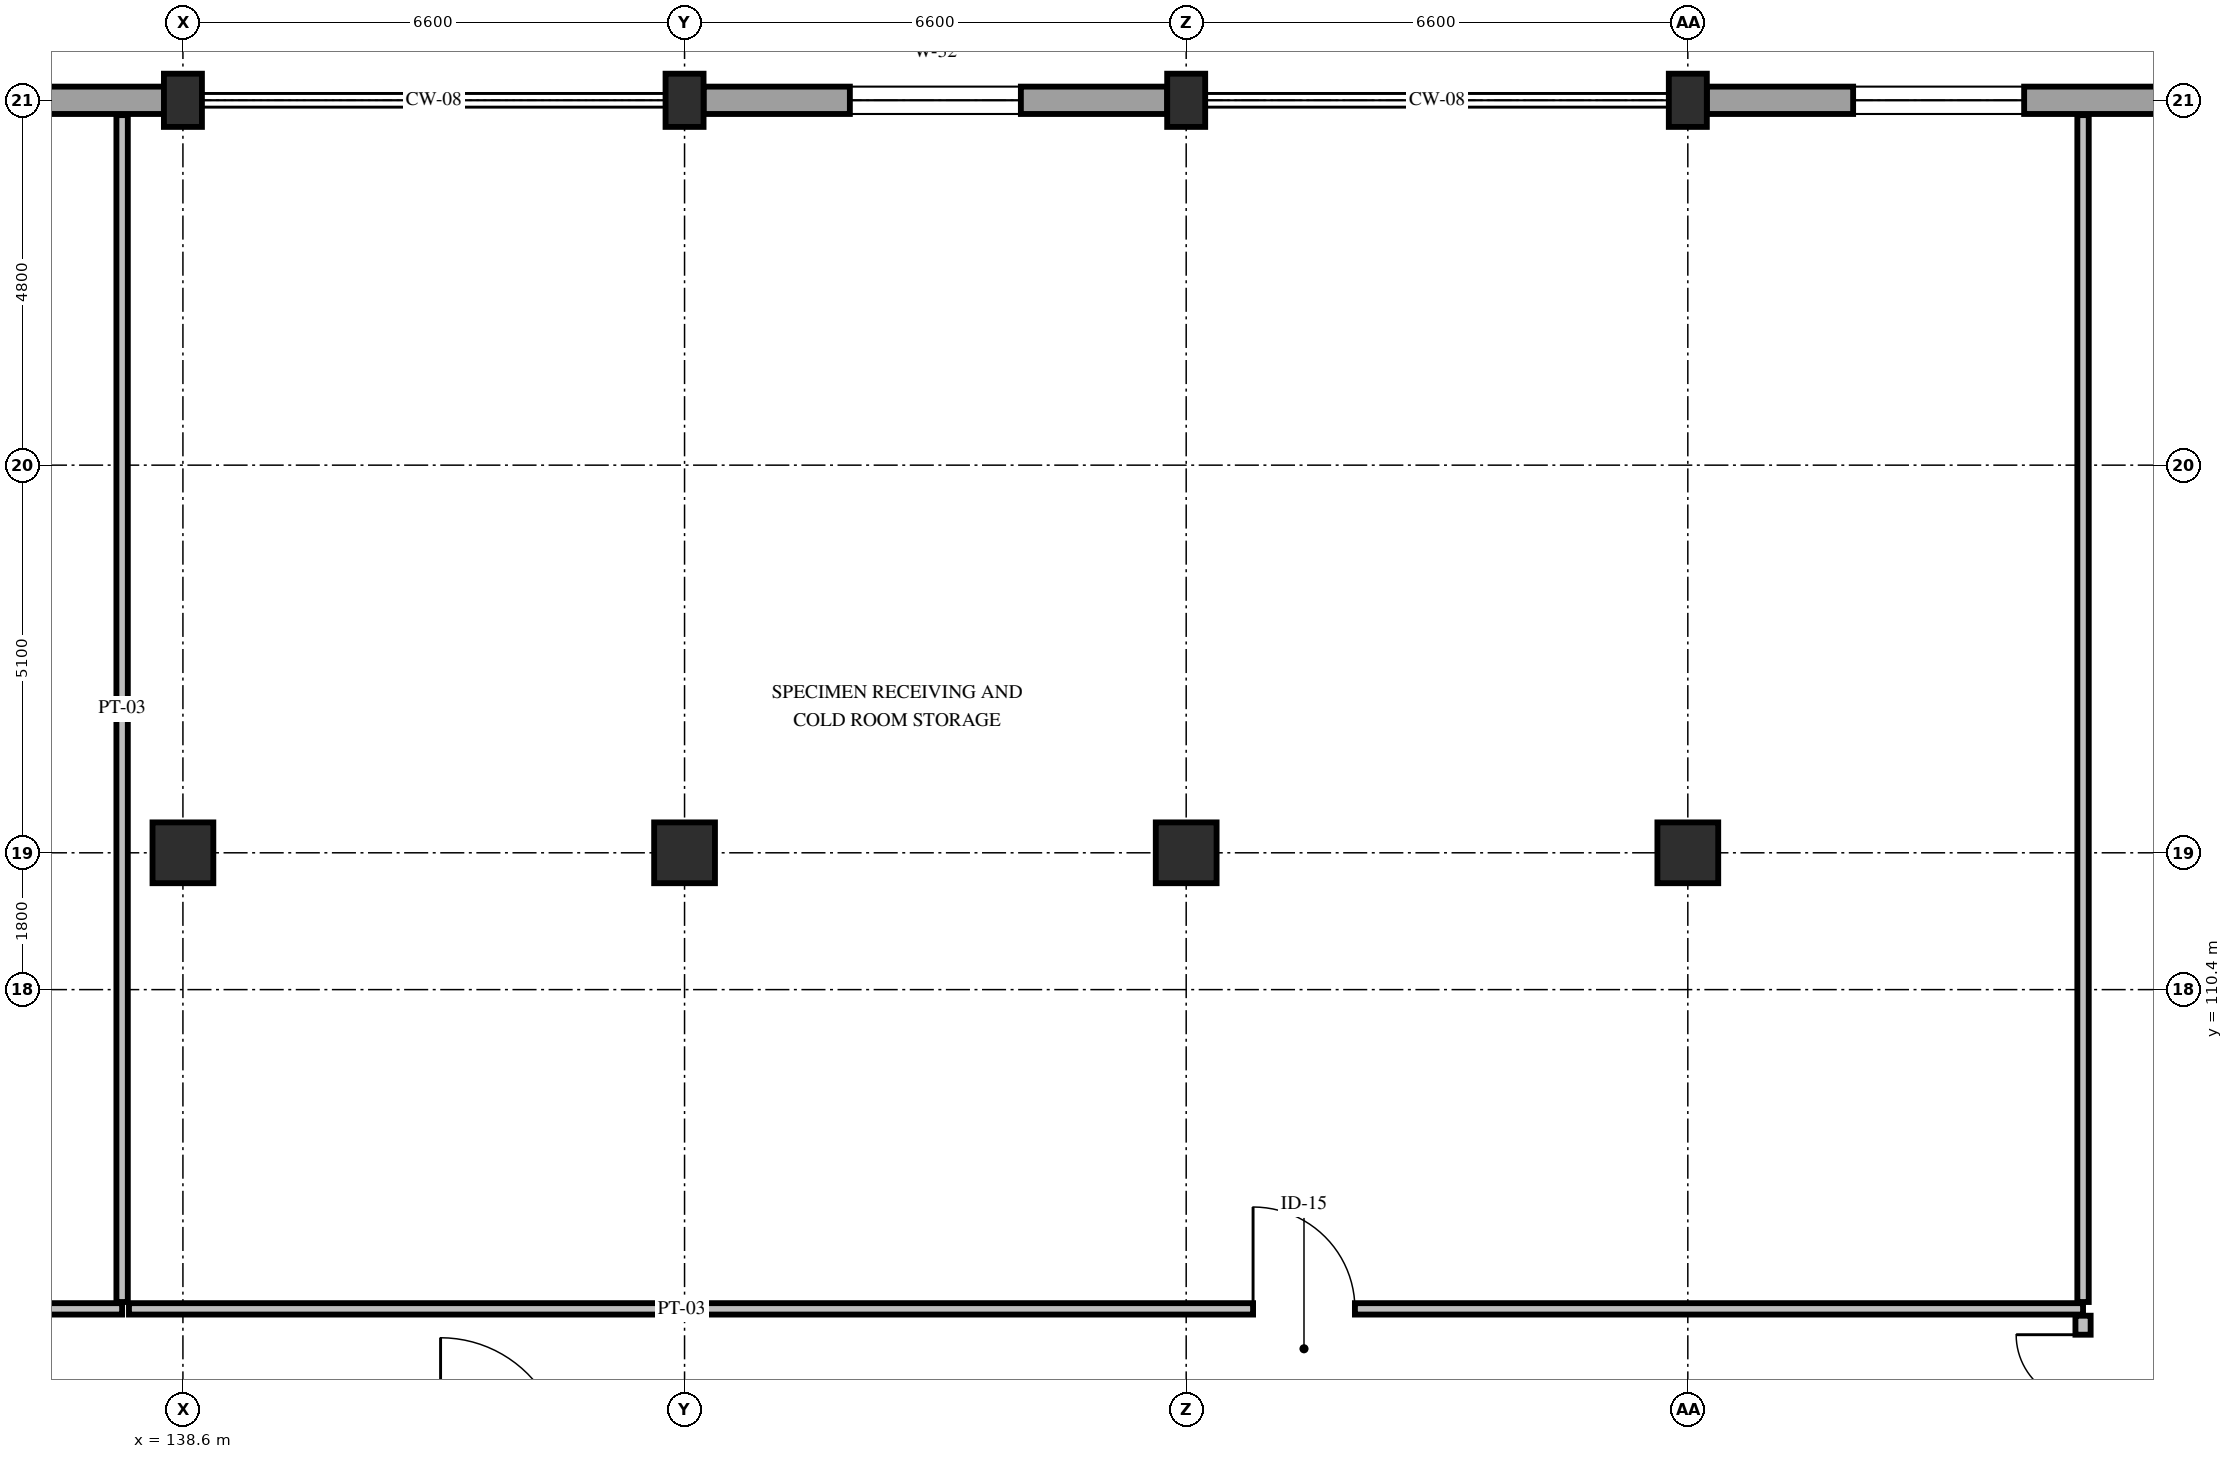
"""IFC4 building model, lengths in metres.
Left out: names, types, materials, properties, quantities, classifications, styles, units other than length and angle.
Written with IfcOpenShell. Run it as: python <this file> out.ifc"""

import sys

from ifc_helpers import new_model, si_unit, direction, frame, frame_2d, origin, origin_2d, place, context, subcontext, project, spatial, rectangle, extrude, element, fill, save


model = new_model("IFC4")
c1 = context("Model", 3, precision=1e-05, world=origin(), true_north=direction((0.0, 1.0)))
c2 = subcontext(c1, "Body", "Model", "MODEL_VIEW")
j1 = project(units=[si_unit("LENGTHUNIT", "METRE"), si_unit("PLANEANGLEUNIT", "RADIAN")], contexts=[c1])
p1 = place(None, origin())
s1 = spatial("IfcSite", under=j1, at=p1, CompositionType="ELEMENT")
p2 = place(p1, origin())
s2 = spatial("IfcBuilding", under=s1, at=p2, CompositionType="ELEMENT")
p3 = place(p2, origin())
s3 = spatial("IfcBuildingStorey", under=s2, at=p3, CompositionType="ELEMENT", Elevation=0.0)
p4 = place(p3, frame((138.6, 112.2, 0.0), z_axis=(0.0, 0.0, 1.0), x_axis=(1.0, 0.0, 0.0)))
e1 = element("IfcColumn", 1, at=p4, inside=s3, PredefinedType="COLUMN", context=c2, shape_type="SweptSolid", body=[
    extrude(rectangle(XDim=0.8, YDim=0.8, at=origin_2d()), origin(), (0.0, 0.0, 1.0), 5.4),
])
p5 = place(p3, frame((138.6, 122.1, 0.0), z_axis=(0.0, 0.0, 1.0), x_axis=(1.0, 0.0, 0.0)))
e2 = element("IfcColumn", 2, at=p5, inside=s3, PredefinedType="PILASTER", context=c2, shape_type="SweptSolid", body=[
    extrude(rectangle(XDim=0.5, YDim=0.7, at=origin_2d()), origin(), (0.0, 0.0, 1.0), 5.4),
])
p6 = place(p3, frame((145.2, 112.2, 0.0), z_axis=(0.0, 0.0, 1.0), x_axis=(1.0, 0.0, 0.0)))
e3 = element("IfcColumn", 3, at=p6, inside=s3, PredefinedType="COLUMN", context=c2, shape_type="SweptSolid", body=[
    extrude(rectangle(XDim=0.8, YDim=0.8, at=origin_2d()), origin(), (0.0, 0.0, 1.0), 5.4),
])
p7 = place(p3, frame((145.2, 122.1, 0.0), z_axis=(0.0, 0.0, 1.0), x_axis=(1.0, 0.0, 0.0)))
e4 = element("IfcColumn", 4, at=p7, inside=s3, PredefinedType="PILASTER", context=c2, shape_type="SweptSolid", body=[
    extrude(rectangle(XDim=0.5, YDim=0.7, at=origin_2d()), origin(), (0.0, 0.0, 1.0), 5.4),
])
p8 = place(p3, frame((151.8, 112.2, 0.0), z_axis=(0.0, 0.0, 1.0), x_axis=(1.0, 0.0, 0.0)))
e5 = element("IfcColumn", 5, at=p8, inside=s3, PredefinedType="COLUMN", context=c2, shape_type="SweptSolid", body=[
    extrude(rectangle(XDim=0.8, YDim=0.8, at=origin_2d()), origin(), (0.0, 0.0, 1.0), 5.4),
])
p9 = place(p3, frame((151.8, 122.1, 0.0), z_axis=(0.0, 0.0, 1.0), x_axis=(1.0, 0.0, 0.0)))
e6 = element("IfcColumn", 6, at=p9, inside=s3, PredefinedType="PILASTER", context=c2, shape_type="SweptSolid", body=[
    extrude(rectangle(XDim=0.5, YDim=0.7, at=origin_2d()), origin(), (0.0, 0.0, 1.0), 5.4),
])
p10 = place(p3, frame((158.4, 112.2, 0.0), z_axis=(0.0, 0.0, 1.0), x_axis=(1.0, 0.0, 0.0)))
e7 = element("IfcColumn", 7, at=p10, inside=s3, PredefinedType="COLUMN", context=c2, shape_type="SweptSolid", body=[
    extrude(rectangle(XDim=0.8, YDim=0.8, at=origin_2d()), origin(), (0.0, 0.0, 1.0), 5.4),
])
p11 = place(p3, frame((158.4, 122.1, 0.0), z_axis=(0.0, 0.0, 1.0), x_axis=(1.0, 0.0, 0.0)))
e8 = element("IfcColumn", 8, at=p11, inside=s3, PredefinedType="PILASTER", context=c2, shape_type="SweptSolid", body=[
    extrude(rectangle(XDim=0.5, YDim=0.7, at=origin_2d()), origin(), (0.0, 0.0, 1.0), 5.4),
])
p12 = place(p3, frame((132.25, 122.1, 0.0), z_axis=(0.0, 0.0, 1.0), x_axis=(1.0, 0.0, 0.0)))
e9 = element("IfcWall", 9, at=p12, inside=s3, PredefinedType="STANDARD", context=c2, shape_type="SweptSolid", body=[
    extrude(rectangle(XDim=6.1, YDim=0.36, at=frame_2d((3.05, 0.0))), origin(), (0.0, 0.0, 1.0), 4.38),
])
p13 = place(p12, frame((1.925, 0.0, 0.85)))
e10 = element("IfcOpeningElement", 10, at=p13, cuts=e9, PredefinedType="OPENING", context=c2, shape_type="SweptSolid", body=[
    extrude(rectangle(XDim=2.25, YDim=1.88, at=frame_2d((1.125, 0.94))), frame((0.0, 0.195, 0.0), z_axis=(0.0, -1.0, 0.0), x_axis=(1.0, 0.0, 0.0)), (0.0, 0.0, 1.0), 0.39),
])
p14 = place(p3, frame((145.45, 122.1, 0.0), z_axis=(0.0, 0.0, 1.0), x_axis=(1.0, 0.0, 0.0)))
e11 = element("IfcWall", 11, at=p14, inside=s3, PredefinedType="STANDARD", context=c2, shape_type="SweptSolid", body=[
    extrude(rectangle(XDim=6.1, YDim=0.36, at=frame_2d((3.05, 0.0))), origin(), (0.0, 0.0, 1.0), 4.38),
])
p15 = place(p14, frame((1.925, 0.0, 0.85)))
e12 = element("IfcOpeningElement", 12, at=p15, cuts=e11, PredefinedType="OPENING", context=c2, shape_type="SweptSolid", body=[
    extrude(rectangle(XDim=2.25, YDim=1.88, at=frame_2d((1.125, 0.94))), frame((0.0, 0.195, 0.0), z_axis=(0.0, -1.0, 0.0), x_axis=(1.0, 0.0, 0.0)), (0.0, 0.0, 1.0), 0.39),
])
p16 = place(p3, frame((158.65, 122.1, 0.0), z_axis=(0.0, 0.0, 1.0), x_axis=(1.0, 0.0, 0.0)))
e13 = element("IfcWall", 13, at=p16, inside=s3, PredefinedType="STANDARD", context=c2, shape_type="SweptSolid", body=[
    extrude(rectangle(XDim=6.1, YDim=0.36, at=frame_2d((3.05, 0.0))), origin(), (0.0, 0.0, 1.0), 4.38),
])
p17 = place(p16, frame((1.925, 0.0, 0.85)))
e14 = element("IfcOpeningElement", 14, at=p17, cuts=e13, PredefinedType="OPENING", context=c2, shape_type="SweptSolid", body=[
    extrude(rectangle(XDim=2.25, YDim=1.88, at=frame_2d((1.125, 0.94))), frame((0.0, 0.195, 0.0), z_axis=(0.0, -1.0, 0.0), x_axis=(1.0, 0.0, 0.0)), (0.0, 0.0, 1.0), 0.39),
])
p18 = place(p3, frame((119.04, 106.2, 0.0), z_axis=(0.0, 0.0, 1.0), x_axis=(1.0, 0.0, 0.0)))
e15 = element("IfcWall", 15, at=p18, inside=s3, PredefinedType="PARTITIONING", context=c2, shape_type="SweptSolid", body=[
    extrude(rectangle(XDim=18.76, YDim=0.15, at=frame_2d((9.38, 0.0))), origin(), (0.0, 0.0, 1.0), 4.38),
])
p19 = place(p18, frame((8.59, 0.0, 0.0)))
e16 = element("IfcOpeningElement", 16, at=p19, cuts=e15, PredefinedType="OPENING", context=c2, shape_type="SweptSolid", body=[
    extrude(rectangle(XDim=1.62, YDim=2.3, at=frame_2d((0.81, 1.15))), frame((0.0, 0.09, 0.0), z_axis=(0.0, -1.0, 0.0), x_axis=(1.0, 0.0, 0.0)), (0.0, 0.0, 1.0), 0.18),
])
p20 = place(p3, frame((137.8, 106.29, 0.0), z_axis=(0.0, 0.0, 1.0), x_axis=(0.0, 1.0, 0.0)))
e17 = element("IfcWall", 17, at=p20, inside=s3, PredefinedType="PARTITIONING", context=c2, shape_type="SweptSolid", body=[
    extrude(rectangle(XDim=15.615, YDim=0.15, at=frame_2d((7.808, 0.0))), origin(), (0.0, 0.0, 1.0), 4.53),
])
p21 = place(p3, frame((137.89, 106.2, 0.0), z_axis=(0.0, 0.0, 1.0), x_axis=(1.0, 0.0, 0.0)))
e18 = element("IfcWall", 18, at=p21, inside=s3, PredefinedType="PARTITIONING", context=c2, shape_type="SweptSolid", body=[
    extrude(rectangle(XDim=25.71, YDim=0.15, at=frame_2d((12.855, 0.0))), origin(), (0.0, 0.0, 1.0), 4.38),
])
p22 = place(p21, frame((14.79, 0.0, 0.0)))
e19 = element("IfcOpeningElement", 19, at=p22, cuts=e18, PredefinedType="OPENING", context=c2, shape_type="SweptSolid", body=[
    extrude(rectangle(XDim=1.34, YDim=2.2, at=frame_2d((0.67, 1.1))), frame((0.0, 0.09, 0.0), z_axis=(0.0, -1.0, 0.0), x_axis=(1.0, 0.0, 0.0)), (0.0, 0.0, 1.0), 0.18),
])
p23 = place(p3, frame((163.6, 106.29, 0.0), z_axis=(0.0, 0.0, 1.0), x_axis=(0.0, 1.0, 0.0)))
e20 = element("IfcWall", 20, at=p23, inside=s3, PredefinedType="PARTITIONING", context=c2, shape_type="SweptSolid", body=[
    extrude(rectangle(XDim=15.615, YDim=0.15, at=frame_2d((7.808, 0.0))), origin(), (0.0, 0.0, 1.0), 4.53),
])
p24 = place(p3, frame((163.6, 102.3, 0.0), z_axis=(0.0, 0.0, 1.0), x_axis=(0.0, 1.0, 0.0)))
e21 = element("IfcWall", 21, at=p24, inside=s3, PredefinedType="PARTITIONING", context=c2, shape_type="SweptSolid", body=[
    extrude(rectangle(XDim=3.81, YDim=0.2, at=frame_2d((1.905, 0.0))), origin(), (0.0, 0.0, 1.0), 4.665),
])
p25 = place(p24, frame((1.8, 0.0, 0.0)))
e22 = element("IfcOpeningElement", 22, at=p25, cuts=e21, PredefinedType="OPENING", context=c2, shape_type="SweptSolid", body=[
    extrude(rectangle(XDim=1.76, YDim=2.35, at=frame_2d((0.88, 1.175))), frame((0.0, 0.115, 0.0), z_axis=(0.0, -1.0, 0.0), x_axis=(1.0, 0.0, 0.0)), (0.0, 0.0, 1.0), 0.23),
])
p26 = place(p15, origin())
e23 = element("IfcWindow", 23, at=p26, inside=s3, PartitioningType="DOUBLE_PANEL_VERTICAL", PredefinedType="WINDOW", context=c2, shape_type="SweptSolid", body=[
    extrude(rectangle(XDim=2.25, YDim=1.88, at=frame_2d((1.125, 0.94))), frame((0.0, 0.03, 0.0), z_axis=(0.0, -1.0, 0.0), x_axis=(1.0, 0.0, 0.0)), (0.0, 0.0, 1.0), 0.06),
])
fill(e12, e23)
p27 = place(p17, origin())
e24 = element("IfcWindow", 24, at=p27, inside=s3, PartitioningType="DOUBLE_PANEL_VERTICAL", PredefinedType="WINDOW", context=c2, shape_type="SweptSolid", body=[
    extrude(rectangle(XDim=2.25, YDim=1.88, at=frame_2d((1.125, 0.94))), frame((0.0, 0.03, 0.0), z_axis=(0.0, -1.0, 0.0), x_axis=(1.0, 0.0, 0.0)), (0.0, 0.0, 1.0), 0.06),
])
fill(e14, e24)
p28 = place(p22, origin())
e25 = element("IfcDoor", 25, at=p28, inside=s3, OperationType="SINGLE_SWING_LEFT", PredefinedType="DOOR", context=c2, shape_type="SweptSolid", body=[
    extrude(rectangle(XDim=1.34, YDim=2.2, at=frame_2d((0.67, 1.1))), frame((0.0, 0.025, 0.0), z_axis=(0.0, -1.0, 0.0), x_axis=(1.0, 0.0, 0.0)), (0.0, 0.0, 1.0), 0.05),
])
fill(e19, e25)
p29 = place(p25, origin())
e26 = element("IfcDoor", 26, at=p29, inside=s3, OperationType="DOUBLE_DOOR_SINGLE_SWING", PredefinedType="DOOR", context=c2, shape_type="SweptSolid", body=[
    extrude(rectangle(XDim=1.76, YDim=2.35, at=frame_2d((0.88, 1.175))), frame((0.0, 0.025, 0.0), z_axis=(0.0, -1.0, 0.0), x_axis=(1.0, 0.0, 0.0)), (0.0, 0.0, 1.0), 0.05),
])
fill(e22, e26)
save(model, sys.argv[1])
